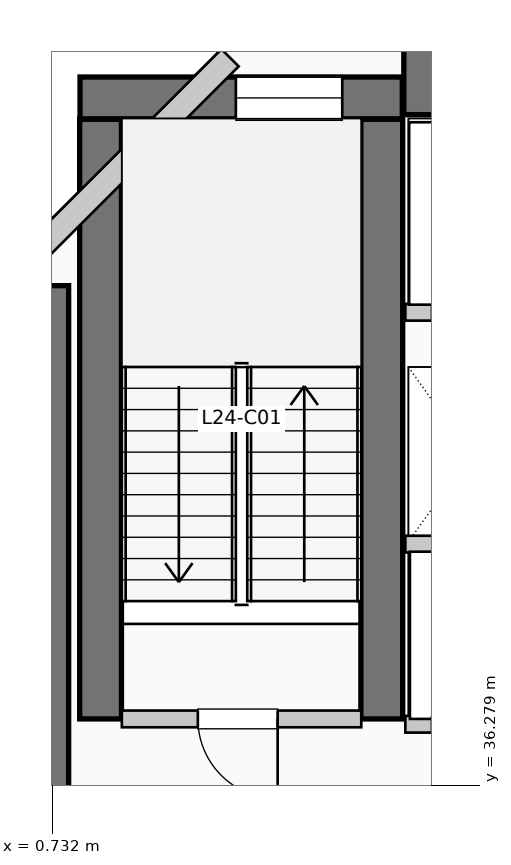
"""IFC4 building model, lengths in metres.
Left out: names, types, materials, properties, quantities, classifications, styles, units other than length and angle.
Written with IfcOpenShell. Run it as: python <this file> out.ifc"""

import sys

from ifc_helpers import new_model, si_unit, direction, frame, frame_2d, origin, place, context, subcontext, project, spatial, rectangle, extrude, element, fill, save


model = new_model("IFC4")
c1 = context("Model", 3, precision=1e-05, world=origin(), true_north=direction((0.0, 1.0)))
c2 = subcontext(c1, "Body", "Model", "MODEL_VIEW")
j1 = project(units=[si_unit("LENGTHUNIT", "METRE"), si_unit("PLANEANGLEUNIT", "RADIAN")], contexts=[c1])
p1 = place(None, origin())
s1 = spatial("IfcSite", under=j1, at=p1, CompositionType="ELEMENT")
p2 = place(p1, origin())
s2 = spatial("IfcBuilding", under=s1, at=p2, CompositionType="ELEMENT")
p3 = place(p2, frame((0.0, 0.0, 102.63)))
s3 = spatial("IfcBuildingStorey", under=s2, at=p3, CompositionType="ELEMENT", Elevation=102.63)
p4 = place(p3, frame((5.36, 45.55, 0.0), z_axis=(0.0, 0.0, 1.0), x_axis=(1.0, 0.0, 0.0)))
e1 = element("IfcWall", 1, at=p4, inside=s3, PredefinedType="SHEAR", context=c2, shape_type="SweptSolid", body=[
    extrude(rectangle(XDim=13.98, YDim=0.9, at=frame_2d((6.99, 0.0))), origin(), (0.0, 0.0, 1.0), 3.96),
])
p5 = place(p3, frame((0.5, 34.95, 0.0), z_axis=(0.0, 0.0, 1.0), x_axis=(0.0, 1.0, 0.0)))
e2 = element("IfcWall", 2, at=p5, inside=s3, PredefinedType="SHEAR", context=c2, shape_type="SweptSolid", body=[
    extrude(rectangle(XDim=7.9, YDim=0.9, at=frame_2d((3.95, 0.0))), origin(), (0.0, 0.0, 1.0), 3.96),
])
for number, where, z_axis, x_axis in (
    (3, (1.37, 37.15, 0.0), (0.0, 0.0, 1.0), (0.0, 1.0, 0.0)),
    (4, (5.07, 37.15, 0.0), (0.0, 0.0, 1.0), (0.0, 1.0, 0.0)),
):
    element("IfcWall", number, at=place(p3, frame(where, z_axis=z_axis, x_axis=x_axis)), inside=s3, PredefinedType="SHEAR", context=c2, shape_type="SweptSolid", body=[
        extrude(rectangle(XDim=7.89, YDim=0.55, at=frame_2d((3.945, 0.0))), origin(), (0.0, 0.0, 1.0), 3.96),
    ])
p6 = place(p3, frame((1.1, 45.32, 0.0), z_axis=(0.0, 0.0, 1.0), x_axis=(1.0, 0.0, 0.0)))
e5 = element("IfcWall", 5, at=p6, inside=s3, PredefinedType="SHEAR", context=c2, shape_type="SweptSolid", body=[
    extrude(rectangle(XDim=4.24, YDim=0.55, at=frame_2d((2.12, 0.0))), origin(), (0.0, 0.0, 1.0), 3.96),
])
p7 = place(p6, frame((2.05, 0.0, 1.05)))
e6 = element("IfcOpeningElement", 6, at=p7, cuts=e5, PredefinedType="OPENING", context=c2, shape_type="SweptSolid", body=[
    extrude(rectangle(XDim=1.4, YDim=1.8, at=frame_2d((0.7, 0.9))), frame((0.0, 0.285, 0.0), z_axis=(0.0, -1.0, 0.0), x_axis=(1.0, 0.0, 0.0)), (0.0, 0.0, 1.0), 0.57),
])
p8 = place(p3, frame((3.074, 45.848, 0.0), z_axis=(0.0, 0.0, 1.0), x_axis=(-0.707106781187, -0.707106781187, 0.0)))
e7 = element("IfcWall", 7, at=p8, inside=s3, PredefinedType="SOLIDWALL", context=c2, shape_type="SweptSolid", body=[
    extrude(rectangle(XDim=4.133, YDim=0.32, at=frame_2d((2.066, 0.0))), origin(), (0.0, 0.0, 1.0), 3.71),
])
p9 = place(p3, frame((1.65, 37.15, 0.0), z_axis=(0.0, 0.0, 1.0), x_axis=(1.0, 0.0, 0.0)))
e8 = element("IfcWall", 8, at=p9, inside=s3, PredefinedType="PARTITIONING", context=c2, shape_type="SweptSolid", body=[
    extrude(rectangle(XDim=3.15, YDim=0.22, at=frame_2d((1.575, 0.0))), origin(), (0.0, 0.0, 1.0), 3.71),
])
p10 = place(p9, frame((2.05, 0.0, 0.0), z_axis=(0.0, 0.0, 1.0), x_axis=(-1.0, 0.0, 0.0)))
e9 = element("IfcOpeningElement", 9, at=p10, cuts=e8, PredefinedType="OPENING", context=c2, shape_type="SweptSolid", body=[
    extrude(rectangle(XDim=1.05, YDim=2.15, at=frame_2d((0.525, 1.075))), frame((0.0, 0.12, 0.0), z_axis=(0.0, -1.0, 0.0), x_axis=(1.0, 0.0, 0.0)), (0.0, 0.0, 1.0), 0.24),
])
p11 = place(p3, frame((5.38, 37.08, 0.0), z_axis=(0.0, 0.0, 1.0), x_axis=(1.0, 0.0, 0.0)))
e10 = element("IfcWall", 10, at=p11, inside=s3, PredefinedType="PARTITIONING", context=c2, shape_type="SweptSolid", body=[
    extrude(rectangle(XDim=3.46, YDim=0.22, at=frame_2d((1.73, 0.0))), origin(), (0.0, 0.0, 1.0), 3.71),
])
p12 = place(p11, frame((1.55, 0.0, 0.0), z_axis=(0.0, 0.0, 1.0), x_axis=(-1.0, 0.0, 0.0)))
e11 = element("IfcOpeningElement", 11, at=p12, cuts=e10, PredefinedType="OPENING", context=c2, shape_type="SweptSolid", body=[
    extrude(rectangle(XDim=1.2, YDim=2.2, at=frame_2d((0.6, 1.1))), frame((0.0, 0.12, 0.0), z_axis=(0.0, -1.0, 0.0), x_axis=(1.0, 0.0, 0.0)), (0.0, 0.0, 1.0), 0.24),
])
p13 = place(p11, frame((3.22, 0.0, 0.0), z_axis=(0.0, 0.0, 1.0), x_axis=(-1.0, 0.0, 0.0)))
e12 = element("IfcOpeningElement", 12, at=p13, cuts=e10, PredefinedType="OPENING", context=c2, shape_type="SweptSolid", body=[
    extrude(rectangle(XDim=1.2, YDim=2.2, at=frame_2d((0.6, 1.1))), frame((0.0, 0.12, 0.0), z_axis=(0.0, -1.0, 0.0), x_axis=(1.0, 0.0, 0.0)), (0.0, 0.0, 1.0), 0.24),
])
p14 = place(p3, frame((5.38, 39.45, 0.0), z_axis=(0.0, 0.0, 1.0), x_axis=(1.0, 0.0, 0.0)))
e13 = element("IfcWall", 13, at=p14, inside=s3, PredefinedType="PARTITIONING", context=c2, shape_type="SweptSolid", body=[
    extrude(rectangle(XDim=3.46, YDim=0.22, at=frame_2d((1.73, 0.0))), origin(), (0.0, 0.0, 1.0), 3.71),
])
p15 = place(p3, frame((5.38, 42.5, 0.0), z_axis=(0.0, 0.0, 1.0), x_axis=(1.0, 0.0, 0.0)))
e14 = element("IfcWall", 14, at=p15, inside=s3, PredefinedType="PARTITIONING", context=c2, shape_type="SweptSolid", body=[
    extrude(rectangle(XDim=3.77, YDim=0.22, at=frame_2d((1.885, 0.0))), origin(), (0.0, 0.0, 1.0), 3.71),
])
p16 = place(p15, frame((1.75, 0.0, 0.0), z_axis=(0.0, 0.0, 1.0), x_axis=(-1.0, 0.0, 0.0)))
e15 = element("IfcOpeningElement", 15, at=p16, cuts=e14, PredefinedType="OPENING", context=c2, shape_type="SweptSolid", body=[
    extrude(rectangle(XDim=1.4, YDim=2.2, at=frame_2d((0.7, 1.1))), frame((0.0, 0.12, 0.0), z_axis=(0.0, -1.0, 0.0), x_axis=(1.0, 0.0, 0.0)), (0.0, 0.0, 1.0), 0.24),
])
p17 = place(p15, frame((3.53, 0.0, 0.0), z_axis=(0.0, 0.0, 1.0), x_axis=(-1.0, 0.0, 0.0)))
e16 = element("IfcOpeningElement", 16, at=p17, cuts=e14, PredefinedType="OPENING", context=c2, shape_type="SweptSolid", body=[
    extrude(rectangle(XDim=1.4, YDim=2.2, at=frame_2d((0.7, 1.1))), frame((0.0, 0.12, 0.0), z_axis=(0.0, -1.0, 0.0), x_axis=(1.0, 0.0, 0.0)), (0.0, 0.0, 1.0), 0.24),
])
p18 = place(p7, origin())
e17 = element("IfcWindow", 17, at=p18, inside=s3, PartitioningType="SINGLE_PANEL", PredefinedType="WINDOW", context=c2, shape_type="SweptSolid", body=[
    extrude(rectangle(XDim=1.4, YDim=1.8, at=frame_2d((0.7, 0.9))), frame((0.0, 0.03, 0.0), z_axis=(0.0, -1.0, 0.0), x_axis=(1.0, 0.0, 0.0)), (0.0, 0.0, 1.0), 0.06),
])
fill(e6, e17)
p19 = place(p10, origin())
e18 = element("IfcDoor", 18, at=p19, inside=s3, OperationType="SINGLE_SWING_RIGHT", PredefinedType="DOOR", context=c2, shape_type="SweptSolid", body=[
    extrude(rectangle(XDim=1.05, YDim=2.15, at=frame_2d((0.525, 1.075))), frame((0.0, 0.025, 0.0), z_axis=(0.0, -1.0, 0.0), x_axis=(1.0, 0.0, 0.0)), (0.0, 0.0, 1.0), 0.05),
])
fill(e9, e18)
save(model, sys.argv[1])
